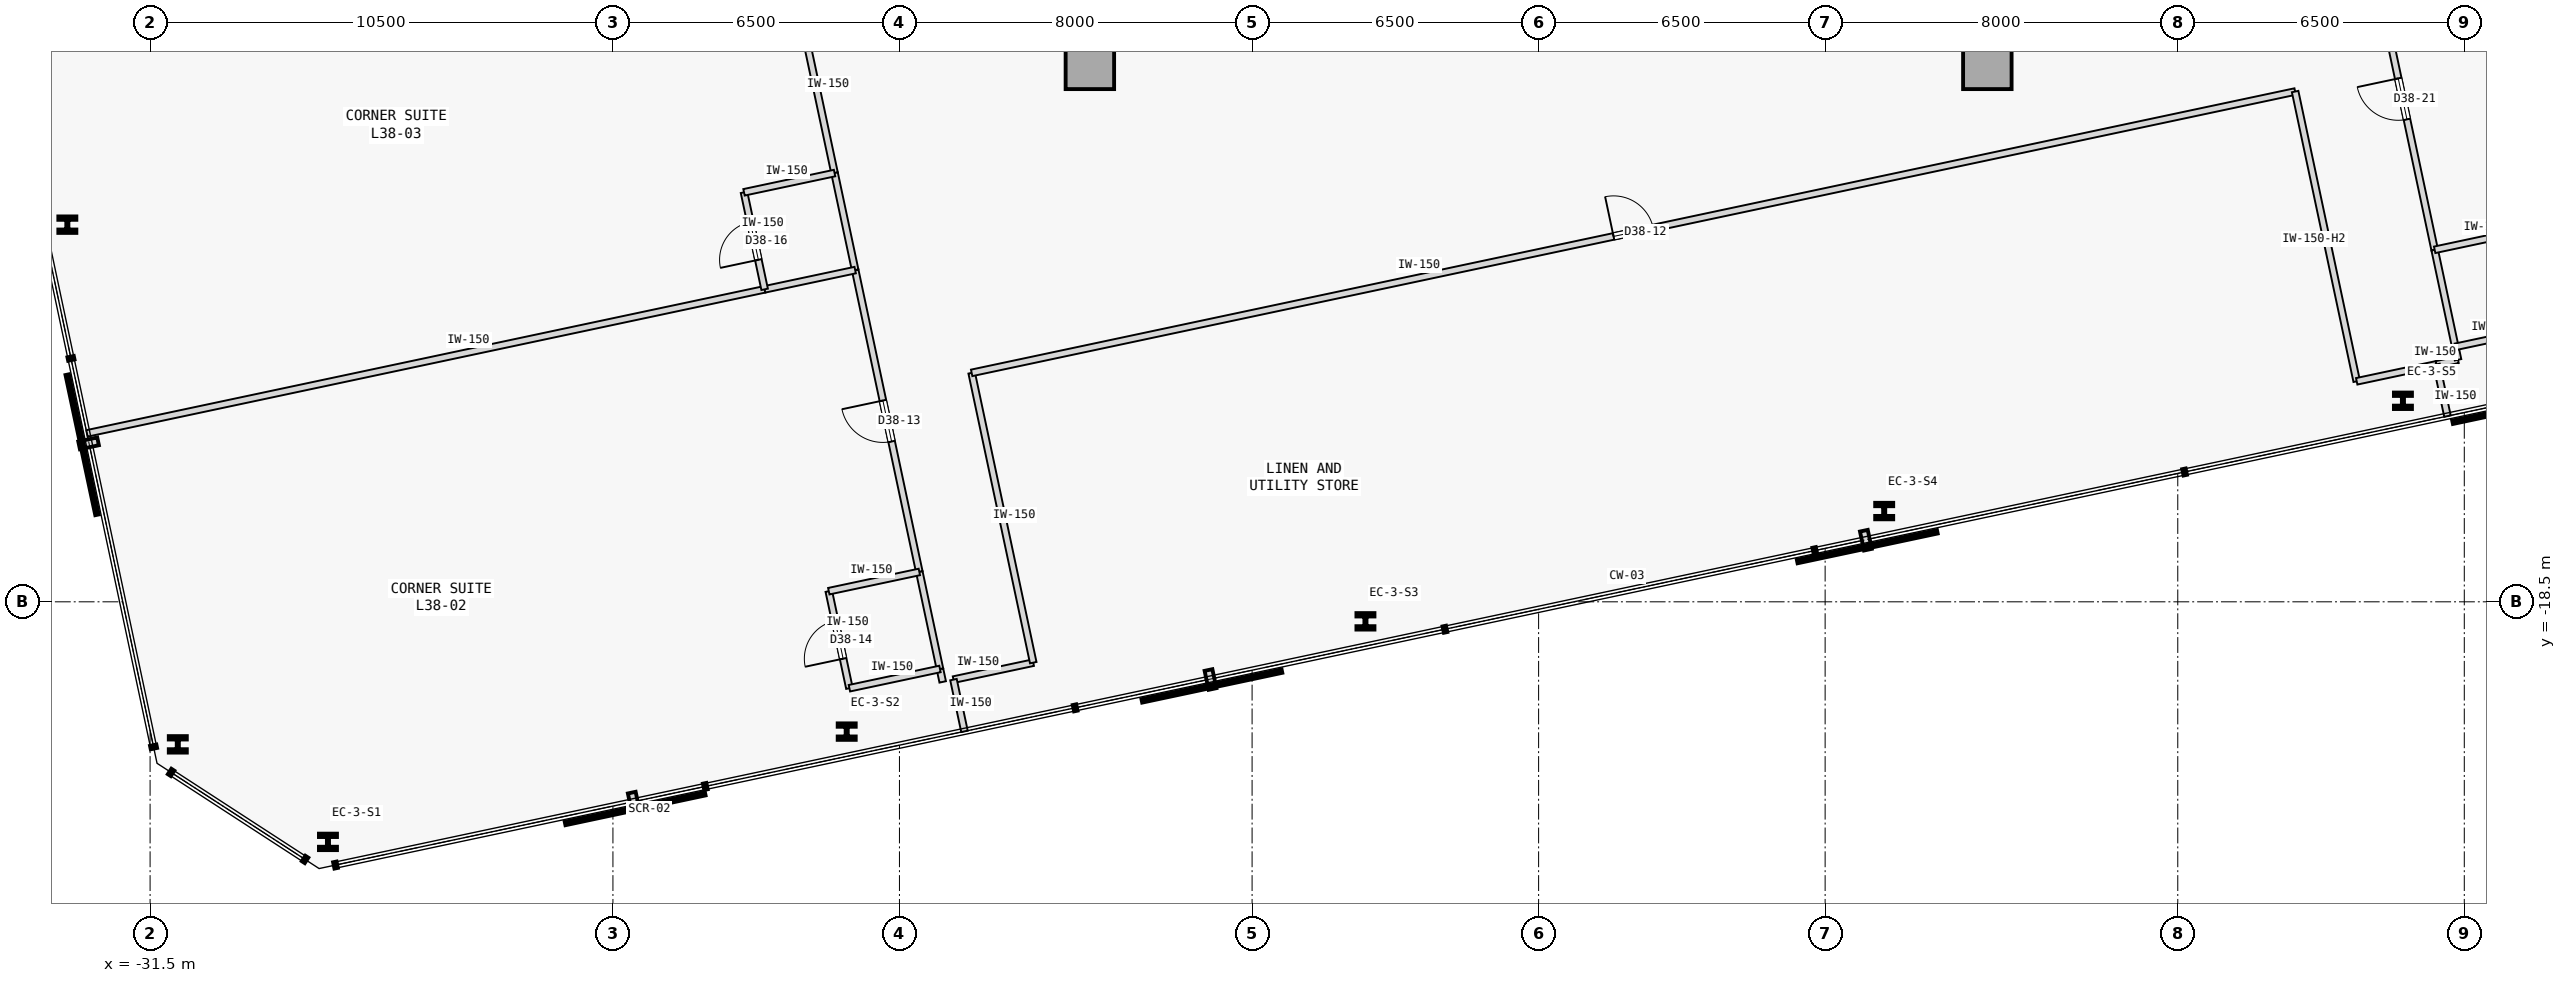
"""IFC4 building model, lengths in metres.
Left out: names, types, materials, properties, quantities, classifications, styles, units other than length and angle.
Written with IfcOpenShell. Run it as: python <this file> out.ifc"""

import sys

from ifc_helpers import new_model, si_unit, direction, frame, frame_2d, origin, origin_2d, place, context, subcontext, project, spatial, rectangle, i_section, extrude, element, fill, save


model = new_model("IFC4")
c1 = context("Model", 3, precision=1e-05, world=origin(), true_north=direction((0.0, 1.0)))
c2 = subcontext(c1, "Body", "Model", "MODEL_VIEW")
j1 = project(units=[si_unit("LENGTHUNIT", "METRE"), si_unit("PLANEANGLEUNIT", "RADIAN")], contexts=[c1])
p1 = place(None, origin())
s1 = spatial("IfcSite", under=j1, at=p1, CompositionType="ELEMENT")
p2 = place(p1, origin())
s2 = spatial("IfcBuilding", under=s1, at=p2, CompositionType="ELEMENT")
p3 = place(p2, frame((0.0, 0.0, 151.4)))
s3 = spatial("IfcBuildingStorey", under=s2, at=p3, CompositionType="ELEMENT", Elevation=151.4)
for number, where, z_axis, x_axis in (
    (1, (-10.18, -6.32, 0.0), (0.0, 0.0, 1.0), (1.0, 0.0, 0.0)),
    (2, (10.18, -6.32, 0.0), (0.0, 0.0, 1.0), (1.0, 0.0, 0.0)),
):
    element("IfcColumn", number, at=place(p3, frame(where, z_axis=z_axis, x_axis=x_axis)), inside=s3, PredefinedType="COLUMN", context=c2, shape_type="SweptSolid", body=[
        extrude(rectangle(XDim=1.1, YDim=1.1, at=origin_2d()), origin(), (0.0, 0.0, 1.0), 3.4),
    ])
for number, where, z_axis, x_axis in (
    (3, (-27.465, -23.946, 0.0), (0.0, 0.0, 1.0), (1.0, 0.0, 0.0)),
    (4, (-15.697, -21.444, 0.0), (0.0, 0.0, 1.0), (1.0, 0.0, 0.0)),
    (5, (-3.928, -18.943, 0.0), (0.0, 0.0, 1.0), (1.0, 0.0, 0.0)),
    (6, (7.84, -16.441, 0.0), (0.0, 0.0, 1.0), (1.0, 0.0, 0.0)),
    (7, (19.608, -13.94, 0.0), (0.0, 0.0, 1.0), (1.0, 0.0, 0.0)),
    (8, (-33.377, -9.945, 0.0), (0.0, 0.0, 1.0), (1.0, 0.0, 0.0)),
    (9, (-30.871, -21.733, 0.0), (0.0, 0.0, 1.0), (1.0, 0.0, 0.0)),
):
    element("IfcColumn", number, at=place(p3, frame(where, z_axis=z_axis, x_axis=x_axis)), inside=s3, PredefinedType="COLUMN", context=c2, shape_type="SweptSolid", body=[
        extrude(i_section(OverallWidth=0.409, OverallDepth=0.374, WebThickness=0.048, FlangeThickness=0.077, FilletRadius=0.015, at=origin_2d()), origin(), (0.0, 0.0, 1.0), 3.4),
    ])
p4 = place(p3, frame((-13.274, -20.265, 0.0), z_axis=(0.0, 0.0, 1.0), x_axis=(0.978160192495, 0.207852442415, 0.0)))
e10 = element("IfcWall", 10, at=p4, inside=s3, PredefinedType="PARTITIONING", context=c2, shape_type="SweptSolid", body=[
    extrude(rectangle(XDim=1.85, YDim=0.15, at=frame_2d((0.925, 0.0))), origin(), (0.0, 0.0, 1.0), 3.175),
])
p5 = place(p3, frame((-11.465, -19.88, 0.0), z_axis=(0.0, 0.0, 1.0), x_axis=(-0.207916109912, 0.978146661416, 0.0)))
e11 = element("IfcWall", 11, at=p5, inside=s3, PredefinedType="PARTITIONING", context=c2, shape_type="SweptSolid", body=[
    extrude(rectangle(XDim=6.72, YDim=0.15, at=frame_2d((3.36, 0.0))), origin(), (0.0, 0.0, 1.0), 3.175),
])
p6 = place(p3, frame((-12.862, -13.307, 0.0), z_axis=(0.0, 0.0, 1.0), x_axis=(0.97814793387, 0.207910123527, 0.0)))
e12 = element("IfcWall", 12, at=p6, inside=s3, PredefinedType="PARTITIONING", context=c2, shape_type="SweptSolid", body=[
    extrude(rectangle(XDim=30.695, YDim=0.15, at=frame_2d((15.348, 0.0))), origin(), (0.0, 0.0, 1.0), 3.175),
])
p7 = place(p6, frame((14.887, 0.0, 0.0)))
e13 = element("IfcOpeningElement", 13, at=p7, cuts=e12, PredefinedType="OPENING", context=c2, shape_type="SweptSolid", body=[
    extrude(rectangle(XDim=0.92, YDim=2.15, at=frame_2d((0.46, 1.075))), frame((0.0, 0.085, 0.0), z_axis=(0.0, -1.0, 0.0), x_axis=(1.0, 0.0, 0.0)), (0.0, 0.0, 1.0), 0.17),
])
p8 = place(p3, frame((18.56, -13.498, 0.0), z_axis=(0.0, 0.0, 1.0), x_axis=(-0.207888737749, 0.978152479278, 0.0)))
e14 = element("IfcWall", 14, at=p8, inside=s3, PredefinedType="PARTITIONING", context=c2, shape_type="SweptSolid", body=[
    extrude(rectangle(XDim=6.72, YDim=0.15, at=frame_2d((3.36, 0.0))), origin(), (0.0, 0.0, 1.0), 2.575),
])
p9 = place(p3, frame((18.56, -13.498, 0.0), z_axis=(0.0, 0.0, 1.0), x_axis=(0.978160192495, 0.207852442415, 0.0)))
e15 = element("IfcWall", 15, at=p9, inside=s3, PredefinedType="PARTITIONING", context=c2, shape_type="SweptSolid", body=[
    extrude(rectangle(XDim=1.85, YDim=0.15, at=frame_2d((0.925, 0.0))), origin(), (0.0, 0.0, 1.0), 3.175),
])
p10 = place(p3, frame((-13.519, -20.317, 0.0), z_axis=(0.0, 0.0, 1.0), x_axis=(-0.207527808066, 0.978229118806, 0.0)))
e16 = element("IfcWall", 16, at=p10, inside=s3, PredefinedType="PARTITIONING", context=c2, shape_type="SweptSolid", body=[
    extrude(rectangle(XDim=0.3, YDim=0.15, at=frame_2d((0.15, 0.0))), origin(), (0.0, 0.0, 1.0), 3.175),
])
p11 = place(p3, frame((-14.049, -17.823, 0.0), z_axis=(0.0, 0.0, 1.0), x_axis=(-0.207940096132, 0.978141562567, 0.0)))
e17 = element("IfcWall", 17, at=p11, inside=s3, PredefinedType="PARTITIONING", context=c2, shape_type="SweptSolid", body=[
    extrude(rectangle(XDim=7.0, YDim=0.15, at=frame_2d((3.5, 0.0))), origin(), (0.0, 0.0, 1.0), 3.175),
])
p12 = place(p11, frame((3.025, 0.0, 0.0)))
e18 = element("IfcOpeningElement", 18, at=p12, cuts=e17, PredefinedType="OPENING", context=c2, shape_type="SweptSolid", body=[
    extrude(rectangle(XDim=0.95, YDim=2.15, at=frame_2d((0.475, 1.075))), frame((0.0, 0.085, 0.0), z_axis=(0.0, -1.0, 0.0), x_axis=(1.0, 0.0, 0.0)), (0.0, 0.0, 1.0), 0.17),
])
p13 = place(p3, frame((-13.581, -20.023, 0.0), z_axis=(0.0, 0.0, 1.0), x_axis=(-0.207891197838, 0.978151956427, 0.0)))
e19 = element("IfcWall", 19, at=p13, inside=s3, PredefinedType="PARTITIONING", context=c2, shape_type="SweptSolid", body=[
    extrude(rectangle(XDim=2.25, YDim=0.15, at=frame_2d((1.125, 0.0))), origin(), (0.0, 0.0, 1.0), 3.175),
])
p14 = place(p3, frame((-15.972, -8.775, 0.0), z_axis=(0.0, 0.0, 1.0), x_axis=(-0.207894825434, 0.97815118543, 0.0)))
e20 = element("IfcWall", 20, at=p14, inside=s3, PredefinedType="PARTITIONING", context=c2, shape_type="SweptSolid", body=[
    extrude(rectangle(XDim=8.5, YDim=0.15, at=frame_2d((4.25, 0.0))), origin(), (0.0, 0.0, 1.0), 3.175),
])
p15 = place(p14, frame((5.05, 0.0, 0.0)))
e21 = element("IfcOpeningElement", 21, at=p15, cuts=e20, PredefinedType="OPENING", context=c2, shape_type="SweptSolid", body=[
    extrude(rectangle(XDim=0.95, YDim=2.15, at=frame_2d((0.475, 1.075))), frame((0.0, 0.085, 0.0), z_axis=(0.0, -1.0, 0.0), x_axis=(1.0, 0.0, 0.0)), (0.0, 0.0, 1.0), 0.17),
])
p16 = place(p3, frame((-15.504, -10.976, 0.0), z_axis=(0.0, 0.0, 1.0), x_axis=(-0.207891197838, 0.978151956427, 0.0)))
e22 = element("IfcWall", 22, at=p16, inside=s3, PredefinedType="PARTITIONING", context=c2, shape_type="SweptSolid", body=[
    extrude(rectangle(XDim=2.25, YDim=0.15, at=frame_2d((1.125, 0.0))), origin(), (0.0, 0.0, 1.0), 3.175),
])
p17 = place(p3, frame((20.369, -13.114, 0.0), z_axis=(0.0, 0.0, 1.0), x_axis=(0.978143962546, 0.207928806409, 0.0)))
e23 = element("IfcWall", 23, at=p17, inside=s3, PredefinedType="PARTITIONING", context=c2, shape_type="SweptSolid", body=[
    extrude(rectangle(XDim=0.5, YDim=0.15, at=frame_2d((0.25, 0.0))), origin(), (0.0, 0.0, 1.0), 3.175),
])
p18 = place(p3, frame((20.858, -13.01, 0.0), z_axis=(0.0, 0.0, 1.0), x_axis=(-0.208306395052, 0.978063620518, 0.0)))
e24 = element("IfcWall", 24, at=p18, inside=s3, PredefinedType="PARTITIONING", context=c2, shape_type="SweptSolid", body=[
    extrude(rectangle(XDim=0.3, YDim=0.15, at=frame_2d((0.15, 0.0))), origin(), (0.0, 0.0, 1.0), 3.175),
])
p19 = place(p3, frame((20.328, -10.515, 0.0), z_axis=(0.0, 0.0, 1.0), x_axis=(-0.207906726269, 0.978148655968, 0.0)))
e25 = element("IfcWall", 25, at=p19, inside=s3, PredefinedType="PARTITIONING", context=c2, shape_type="SweptSolid", body=[
    extrude(rectangle(XDim=7.0, YDim=0.15, at=frame_2d((3.5, 0.0))), origin(), (0.0, 0.0, 1.0), 3.175),
])
p20 = place(p19, frame((3.025, 0.0, 0.0)))
e26 = element("IfcOpeningElement", 26, at=p20, cuts=e25, PredefinedType="OPENING", context=c2, shape_type="SweptSolid", body=[
    extrude(rectangle(XDim=0.95, YDim=2.15, at=frame_2d((0.475, 1.075))), frame((0.0, 0.085, 0.0), z_axis=(0.0, -1.0, 0.0), x_axis=(1.0, 0.0, 0.0)), (0.0, 0.0, 1.0), 0.17),
])
p21 = place(p3, frame((20.796, -12.716, 0.0), z_axis=(0.0, 0.0, 1.0), x_axis=(-0.207891197838, 0.978151956427, 0.0)))
e27 = element("IfcWall", 27, at=p21, inside=s3, PredefinedType="PARTITIONING", context=c2, shape_type="SweptSolid", body=[
    extrude(rectangle(XDim=2.25, YDim=0.15, at=frame_2d((1.125, 0.0))), origin(), (0.0, 0.0, 1.0), 3.175),
])
for number, where, z_axis, x_axis in (
    (28, (-13.025, -21.439, 0.0), (0.0, 0.0, 1.0), (-0.208, 0.978, 0.0)),
    (29, (20.619, -14.288, 0.0), (0.0, 0.0, 1.0), (-0.208, 0.978, 0.0)),
):
    element("IfcWall", number, at=place(p3, frame(where, z_axis=z_axis, x_axis=x_axis)), inside=s3, PredefinedType="PARTITIONING", context=c2, shape_type="SweptSolid", body=[
        extrude(rectangle(XDim=1.2, YDim=0.15, at=frame_2d((0.6, 0.0))), origin(), (0.0, 0.0, 1.0), 3.175),
    ])
p22 = place(p3, frame((-15.635, -20.46, 0.0), z_axis=(0.0, 0.0, 1.0), x_axis=(-0.207913264065, 0.978147266328, 0.0)))
e30 = element("IfcWall", 30, at=p22, inside=s3, PredefinedType="PARTITIONING", context=c2, shape_type="SweptSolid", body=[
    extrude(rectangle(XDim=2.25, YDim=0.15, at=frame_2d((1.125, 0.0))), origin(), (0.0, 0.0, 1.0), 3.175),
])
p23 = place(p22, frame((0.685, 0.0, 0.0)))
e31 = element("IfcOpeningElement", 31, at=p23, cuts=e30, PredefinedType="OPENING", context=c2, shape_type="SweptSolid", body=[
    extrude(rectangle(XDim=0.88, YDim=2.15, at=frame_2d((0.44, 1.075))), frame((0.0, 0.085, 0.0), z_axis=(0.0, -1.0, 0.0), x_axis=(1.0, 0.0, 0.0)), (0.0, 0.0, 1.0), 0.17),
])
for number, where, z_axis, x_axis in (
    (32, (-15.635, -20.46, 0.0), (0.0, 0.0, 1.0), (0.978, 0.208, 0.0)),
    (33, (-16.103, -18.259, 0.0), (0.0, 0.0, 1.0), (0.978, 0.208, 0.0)),
):
    element("IfcWall", number, at=place(p3, frame(where, z_axis=z_axis, x_axis=x_axis)), inside=s3, PredefinedType="PARTITIONING", context=c2, shape_type="SweptSolid", body=[
        extrude(rectangle(XDim=2.1, YDim=0.15, at=frame_2d((1.05, 0.0))), origin(), (0.0, 0.0, 1.0), 3.175),
    ])
p24 = place(p3, frame((-32.933, -14.68, 0.0), z_axis=(0.0, 0.0, 1.0), x_axis=(0.978146137903, 0.207918572776, 0.0)))
e34 = element("IfcWall", 34, at=p24, inside=s3, PredefinedType="PARTITIONING", context=c2, shape_type="SweptSolid", body=[
    extrude(rectangle(XDim=15.718, YDim=0.15, at=frame_2d((7.859, 0.0))), origin(), (0.0, 0.0, 1.0), 3.175),
])
p25 = place(p3, frame((-17.558, -11.412, 0.0), z_axis=(0.0, 0.0, 1.0), x_axis=(0.978153236239, 0.207885176084, 0.0)))
e35 = element("IfcWall", 35, at=p25, inside=s3, PredefinedType="PARTITIONING", context=c2, shape_type="SweptSolid", body=[
    extrude(rectangle(XDim=2.1, YDim=0.15, at=frame_2d((1.05, 0.0))), origin(), (0.0, 0.0, 1.0), 3.175),
])
p26 = place(p3, frame((-17.558, -11.412, 0.0), z_axis=(0.0, 0.0, 1.0), x_axis=(-0.207891197838, 0.978151956427, 0.0)))
e36 = element("IfcWall", 36, at=p26, inside=s3, PredefinedType="PARTITIONING", context=c2, shape_type="SweptSolid", body=[
    extrude(rectangle(XDim=2.25, YDim=0.15, at=frame_2d((1.125, 0.0))), origin(), (0.0, 0.0, 1.0), 3.175),
])
p27 = place(p26, frame((0.685, 0.0, 0.0)))
e37 = element("IfcOpeningElement", 37, at=p27, cuts=e36, PredefinedType="OPENING", context=c2, shape_type="SweptSolid", body=[
    extrude(rectangle(XDim=0.88, YDim=2.15, at=frame_2d((0.44, 1.075))), frame((0.0, 0.085, 0.0), z_axis=(0.0, -1.0, 0.0), x_axis=(1.0, 0.0, 0.0)), (0.0, 0.0, 1.0), 0.17),
])
p28 = place(p3, frame((-18.026, -9.211, 0.0), z_axis=(0.0, 0.0, 1.0), x_axis=(0.978153236239, 0.207885176084, 0.0)))
e38 = element("IfcWall", 38, at=p28, inside=s3, PredefinedType="PARTITIONING", context=c2, shape_type="SweptSolid", body=[
    extrude(rectangle(XDim=2.1, YDim=0.15, at=frame_2d((1.05, 0.0))), origin(), (0.0, 0.0, 1.0), 3.175),
])
for number, where, z_axis, x_axis in (
    (39, (20.796, -12.716, 0.0), (0.0, 0.0, 1.0), (0.978, 0.208, 0.0)),
    (40, (20.328, -10.515, 0.0), (0.0, 0.0, 1.0), (0.978, 0.208, 0.0)),
):
    element("IfcWall", number, at=place(p3, frame(where, z_axis=z_axis, x_axis=x_axis)), inside=s3, PredefinedType="PARTITIONING", context=c2, shape_type="SweptSolid", body=[
        extrude(rectangle(XDim=1.85, YDim=0.15, at=frame_2d((0.925, 0.0))), origin(), (0.0, 0.0, 1.0), 3.175),
    ])
p29 = place(p7, origin())
e41 = element("IfcDoor", 41, at=p29, inside=s3, OperationType="SINGLE_SWING_LEFT", PredefinedType="DOOR", context=c2, shape_type="SweptSolid", body=[
    extrude(rectangle(XDim=0.92, YDim=2.15, at=frame_2d((0.46, 1.075))), frame((0.0, 0.025, 0.0), z_axis=(0.0, -1.0, 0.0), x_axis=(1.0, 0.0, 0.0)), (0.0, 0.0, 1.0), 0.05),
])
fill(e13, e41)
p30 = place(p12, origin())
e42 = element("IfcDoor", 42, at=p30, inside=s3, OperationType="SINGLE_SWING_RIGHT", PredefinedType="DOOR", context=c2, shape_type="SweptSolid", body=[
    extrude(rectangle(XDim=0.95, YDim=2.15, at=frame_2d((0.475, 1.075))), frame((0.0, 0.025, 0.0), z_axis=(0.0, -1.0, 0.0), x_axis=(1.0, 0.0, 0.0)), (0.0, 0.0, 1.0), 0.05),
])
fill(e18, e42)
p31 = place(p23, origin())
e43 = element("IfcDoor", 43, at=p31, inside=s3, OperationType="SINGLE_SWING_LEFT", PredefinedType="DOOR", context=c2, shape_type="SweptSolid", body=[
    extrude(rectangle(XDim=0.88, YDim=2.15, at=frame_2d((0.44, 1.075))), frame((0.0, 0.025, 0.0), z_axis=(0.0, -1.0, 0.0), x_axis=(1.0, 0.0, 0.0)), (0.0, 0.0, 1.0), 0.05),
])
fill(e31, e43)
p32 = place(p27, origin())
e44 = element("IfcDoor", 44, at=p32, inside=s3, OperationType="SINGLE_SWING_LEFT", PredefinedType="DOOR", context=c2, shape_type="SweptSolid", body=[
    extrude(rectangle(XDim=0.88, YDim=2.15, at=frame_2d((0.44, 1.075))), frame((0.0, 0.025, 0.0), z_axis=(0.0, -1.0, 0.0), x_axis=(1.0, 0.0, 0.0)), (0.0, 0.0, 1.0), 0.05),
])
fill(e37, e44)
p33 = place(p20, origin())
e45 = element("IfcDoor", 45, at=p33, inside=s3, OperationType="SINGLE_SWING_RIGHT", PredefinedType="DOOR", context=c2, shape_type="SweptSolid", body=[
    extrude(rectangle(XDim=0.95, YDim=2.15, at=frame_2d((0.475, 1.075))), frame((0.0, 0.025, 0.0), z_axis=(0.0, -1.0, 0.0), x_axis=(1.0, 0.0, 0.0)), (0.0, 0.0, 1.0), 0.05),
])
fill(e26, e45)
save(model, sys.argv[1])
